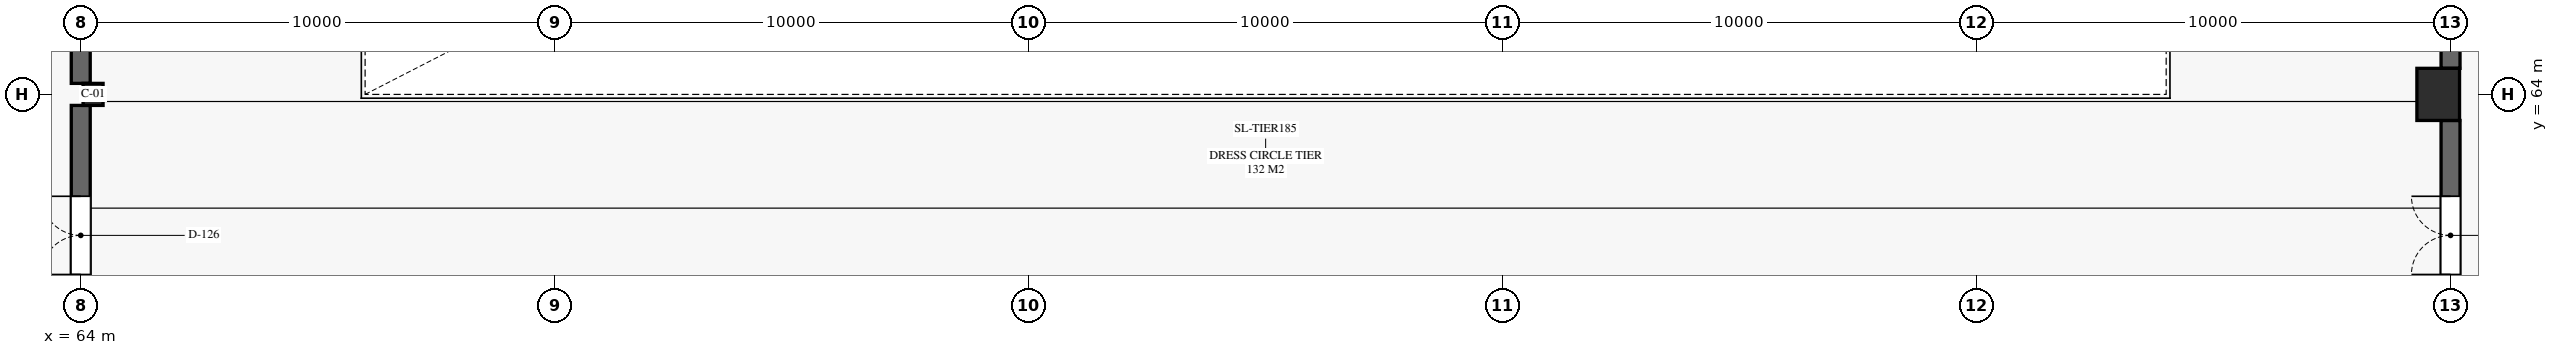
"""IFC4 building model, lengths in metres.
Left out: names, types, materials, properties, quantities, classifications, styles, units other than length and angle.
Written with IfcOpenShell. Run it as: python <this file> out.ifc"""

import sys

from ifc_helpers import new_model, si_unit, direction, frame, frame_2d, origin, origin_2d, place, context, subcontext, project, spatial, rectangle, i_section, extrude, element, fill, save


model = new_model("IFC4")
c1 = context("Model", 3, precision=1e-05, world=origin(), true_north=direction((0.0, 1.0)))
c2 = subcontext(c1, "Body", "Model", "MODEL_VIEW")
j1 = project(units=[si_unit("LENGTHUNIT", "METRE"), si_unit("PLANEANGLEUNIT", "RADIAN")], contexts=[c1])
p1 = place(None, origin())
s1 = spatial("IfcSite", under=j1, at=p1, CompositionType="ELEMENT")
p2 = place(p1, origin())
s2 = spatial("IfcBuilding", under=s1, at=p2, CompositionType="ELEMENT")
p3 = place(p2, frame((0.0, 0.0, 10.0)))
s3 = spatial("IfcBuildingStorey", under=s2, at=p3, CompositionType="ELEMENT", Elevation=10.0)
p4 = place(p3, frame((64.26, 64.0, 0.0), z_axis=(0.0, 0.0, 1.0), x_axis=(1.0, 0.0, 0.0)))
e1 = element("IfcColumn", 1, at=p4, inside=s3, PredefinedType="COLUMN", context=c2, shape_type="SweptSolid", body=[
    extrude(i_section(OverallWidth=0.422, OverallDepth=0.465, WebThickness=0.045, FlangeThickness=0.073, FilletRadius=0.02, at=origin_2d()), origin(), (0.0, 0.0, 1.0), 5.0),
])
p5 = place(p3, frame((113.74, 64.0, 0.0), z_axis=(0.0, 0.0, 1.0), x_axis=(1.0, 0.0, 0.0)))
e2 = element("IfcColumn", 2, at=p5, inside=s3, PredefinedType="COLUMN", context=c2, shape_type="SweptSolid", body=[
    extrude(rectangle(XDim=0.9, YDim=1.1, at=origin_2d()), origin(), (0.0, 0.0, 1.0), 5.0),
])
p6 = place(p3, frame((64.0, 58.0, 0.0), z_axis=(0.0, 0.0, 1.0), x_axis=(0.0, 1.0, 0.0)))
e3 = element("IfcWall", 3, at=p6, inside=s3, PredefinedType="SHEAR", context=c2, shape_type="SweptSolid", body=[
    extrude(rectangle(XDim=5.768, YDim=0.4, at=frame_2d((2.884, 0.0))), origin(), (0.0, 0.0, 1.0), 4.675),
])
p7 = place(p6, frame((2.2, 0.0, 0.0)))
e4 = element("IfcOpeningElement", 4, at=p7, cuts=e3, PredefinedType="OPENING", context=c2, shape_type="SweptSolid", body=[
    extrude(rectangle(XDim=1.65, YDim=2.3, at=frame_2d((0.825, 1.15))), frame((0.0, 0.21, 0.0), z_axis=(0.0, -1.0, 0.0), x_axis=(1.0, 0.0, 0.0)), (0.0, 0.0, 1.0), 0.42),
])
p8 = place(p3, frame((64.0, 64.232, 0.0), z_axis=(0.0, 0.0, 1.0), x_axis=(0.0, 1.0, 0.0)))
e5 = element("IfcWall", 5, at=p8, inside=s3, PredefinedType="SHEAR", context=c2, shape_type="SweptSolid", body=[
    extrude(rectangle(XDim=9.218, YDim=0.4, at=frame_2d((4.609, 0.0))), origin(), (0.0, 0.0, 1.0), 4.675),
])
p9 = place(p3, frame((114.0, 58.0, 0.0), z_axis=(0.0, 0.0, 1.0), x_axis=(0.0, 1.0, 0.0)))
e6 = element("IfcWall", 6, at=p9, inside=s3, PredefinedType="SHEAR", context=c2, shape_type="SweptSolid", body=[
    extrude(rectangle(XDim=5.45, YDim=0.4, at=frame_2d((2.725, 0.0))), origin(), (0.0, 0.0, 1.0), 4.675),
])
p10 = place(p9, frame((2.2, 0.0, 0.0)))
e7 = element("IfcOpeningElement", 7, at=p10, cuts=e6, PredefinedType="OPENING", context=c2, shape_type="SweptSolid", body=[
    extrude(rectangle(XDim=1.65, YDim=2.3, at=frame_2d((0.825, 1.15))), frame((0.0, 0.21, 0.0), z_axis=(0.0, -1.0, 0.0), x_axis=(1.0, 0.0, 0.0)), (0.0, 0.0, 1.0), 0.42),
])
p11 = place(p3, frame((114.0, 64.55, 0.0), z_axis=(0.0, 0.0, 1.0), x_axis=(0.0, 1.0, 0.0)))
e8 = element("IfcWall", 8, at=p11, inside=s3, PredefinedType="SHEAR", context=c2, shape_type="SweptSolid", body=[
    extrude(rectangle(XDim=9.218, YDim=0.4, at=frame_2d((4.609, 0.0))), origin(), (0.0, 0.0, 1.0), 4.675),
])
p12 = place(p7, origin())
e9 = element("IfcDoor", 9, at=p12, inside=s3, OperationType="DOUBLE_DOOR_SINGLE_SWING", PredefinedType="DOOR", context=c2, shape_type="SweptSolid", body=[
    extrude(rectangle(XDim=1.65, YDim=2.3, at=frame_2d((0.825, 1.15))), frame((0.0, 0.025, 0.0), z_axis=(0.0, -1.0, 0.0), x_axis=(1.0, 0.0, 0.0)), (0.0, 0.0, 1.0), 0.05),
])
fill(e4, e9)
p13 = place(p10, origin())
e10 = element("IfcDoor", 10, at=p13, inside=s3, OperationType="DOUBLE_DOOR_SINGLE_SWING", PredefinedType="DOOR", context=c2, shape_type="SweptSolid", body=[
    extrude(rectangle(XDim=1.65, YDim=2.3, at=frame_2d((0.825, 1.15))), frame((0.0, 0.025, 0.0), z_axis=(0.0, -1.0, 0.0), x_axis=(1.0, 0.0, 0.0)), (0.0, 0.0, 1.0), 0.05),
])
fill(e7, e10)
save(model, sys.argv[1])
